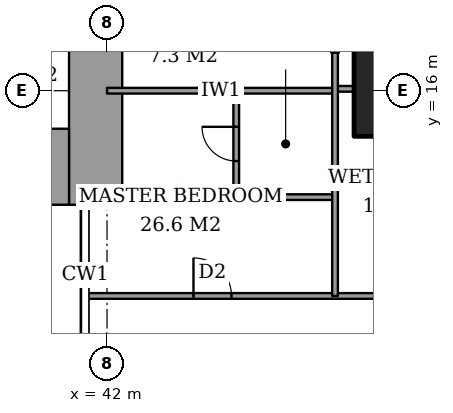
"""IFC4 building model, lengths in metres.
Left out: names, types, materials, properties, quantities, classifications, styles, units other than length and angle.
Written with IfcOpenShell. Run it as: python <this file> out.ifc"""

import sys

from ifc_helpers import new_model, si_unit, direction, frame, frame_2d, origin, origin_2d, place, context, subcontext, project, spatial, rectangle, extrude, element, fill, save


model = new_model("IFC4")
c1 = context("Model", 3, precision=1e-05, world=origin(), true_north=direction((0.0, 1.0)))
c2 = subcontext(c1, "Body", "Model", "MODEL_VIEW")
j1 = project(units=[si_unit("LENGTHUNIT", "METRE"), si_unit("PLANEANGLEUNIT", "RADIAN")], contexts=[c1])
p1 = place(None, origin())
s1 = spatial("IfcSite", under=j1, at=p1, CompositionType="ELEMENT")
p2 = place(p1, origin())
s2 = spatial("IfcBuilding", under=s1, at=p2, CompositionType="ELEMENT")
p3 = place(p2, frame((0.0, 0.0, 80.0)))
s3 = spatial("IfcBuildingStorey", under=s2, at=p3, CompositionType="ELEMENT", Elevation=80.0)
p4 = place(p3, frame((50.0, 16.0, 0.0), z_axis=(0.0, 0.0, 1.0), x_axis=(1.0, 0.0, 0.0)))
e1 = element("IfcColumn", 1, at=p4, inside=s3, PredefinedType="COLUMN", context=c2, shape_type="SweptSolid", body=[
    extrude(rectangle(XDim=3.0, YDim=2.4, at=origin_2d()), origin(), (0.0, 0.0, 1.0), 3.6),
])
p5 = place(p3, frame((37.85, 14.0, 0.0), z_axis=(0.0, 0.0, 1.0), x_axis=(1.0, 0.0, 0.0)))
e2 = element("IfcWall", 2, at=p5, inside=s3, PredefinedType="SHEAR", context=c2, shape_type="SweptSolid", body=[
    extrude(rectangle(XDim=3.15, YDim=2.0, at=frame_2d((1.575, 0.0))), origin(), (0.0, 0.0, 1.0), 3.6),
])
p6 = place(p3, frame((41.7, 13.0, 0.0), z_axis=(0.0, 0.0, 1.0), x_axis=(0.0, 1.0, 0.0)))
e3 = element("IfcWall", 3, at=p6, inside=s3, PredefinedType="SHEAR", context=c2, shape_type="SweptSolid", body=[
    extrude(rectangle(XDim=11.85, YDim=1.4, at=frame_2d((5.925, 0.0))), origin(), (0.0, 0.0, 1.0), 3.6),
])
p7 = place(p6, frame((7.5, 0.0, 0.0)))
e4 = element("IfcOpeningElement", 4, at=p7, cuts=e3, PredefinedType="OPENING", context=c2, shape_type="SweptSolid", body=[
    extrude(rectangle(XDim=1.8, YDim=2.4, at=frame_2d((0.9, 1.2))), frame((0.0, 0.71, 0.0), z_axis=(0.0, -1.0, 0.0), x_axis=(1.0, 0.0, 0.0)), (0.0, 0.0, 1.0), 1.42),
])
p8 = place(p3, frame((41.439, 10.6, 0.0), z_axis=(0.0, 0.0, 1.0), x_axis=(1.0, 0.0, 0.0)))
e5 = element("IfcWall", 5, at=p8, inside=s3, PredefinedType="PARTITIONING", context=c2, shape_type="SweptSolid", body=[
    extrude(rectangle(XDim=25.011, YDim=0.15, at=frame_2d((12.505, 0.0))), origin(), (0.0, 0.0, 1.0), 3.35),
])
p9 = place(p8, frame((10.761, 0.0, 0.0)))
e6 = element("IfcOpeningElement", 6, at=p9, cuts=e5, PredefinedType="OPENING", context=c2, shape_type="SweptSolid", body=[
    extrude(rectangle(XDim=1.0, YDim=2.1, at=frame_2d((0.5, 1.05))), frame((0.0, 0.085, 0.0), z_axis=(0.0, -1.0, 0.0), x_axis=(1.0, 0.0, 0.0)), (0.0, 0.0, 1.0), 0.17),
])
p10 = place(p8, frame((20.924, 0.0, 0.0)))
e7 = element("IfcOpeningElement", 7, at=p10, cuts=e5, PredefinedType="OPENING", context=c2, shape_type="SweptSolid", body=[
    extrude(rectangle(XDim=1.0, YDim=2.1, at=frame_2d((0.5, 1.05))), frame((0.0, 0.085, 0.0), z_axis=(0.0, -1.0, 0.0), x_axis=(1.0, 0.0, 0.0)), (0.0, 0.0, 1.0), 0.17),
])
p11 = place(p8, frame((15.749, 0.0, 0.0)))
e8 = element("IfcOpeningElement", 8, at=p11, cuts=e5, PredefinedType="OPENING", context=c2, shape_type="SweptSolid", body=[
    extrude(rectangle(XDim=0.9, YDim=2.1, at=frame_2d((0.45, 1.05))), frame((0.0, 0.085, 0.0), z_axis=(0.0, -1.0, 0.0), x_axis=(1.0, 0.0, 0.0)), (0.0, 0.0, 1.0), 0.17),
])
p12 = place(p8, frame((12.961, 0.0, 0.0)))
e9 = element("IfcOpeningElement", 9, at=p12, cuts=e5, PredefinedType="OPENING", context=c2, shape_type="SweptSolid", body=[
    extrude(rectangle(XDim=1.0, YDim=2.1, at=frame_2d((0.5, 1.05))), frame((0.0, 0.085, 0.0), z_axis=(0.0, -1.0, 0.0), x_axis=(1.0, 0.0, 0.0)), (0.0, 0.0, 1.0), 0.17),
])
p13 = place(p8, frame((7.861, 0.0, 0.0)))
e10 = element("IfcOpeningElement", 10, at=p13, cuts=e5, PredefinedType="OPENING", context=c2, shape_type="SweptSolid", body=[
    extrude(rectangle(XDim=1.0, YDim=2.1, at=frame_2d((0.5, 1.05))), frame((0.0, 0.085, 0.0), z_axis=(0.0, -1.0, 0.0), x_axis=(1.0, 0.0, 0.0)), (0.0, 0.0, 1.0), 0.17),
])
p14 = place(p8, frame((2.836, 0.0, 0.0)))
e11 = element("IfcOpeningElement", 11, at=p14, cuts=e5, PredefinedType="OPENING", context=c2, shape_type="SweptSolid", body=[
    extrude(rectangle(XDim=1.0, YDim=2.1, at=frame_2d((0.5, 1.05))), frame((0.0, 0.085, 0.0), z_axis=(0.0, -1.0, 0.0), x_axis=(1.0, 0.0, 0.0)), (0.0, 0.0, 1.0), 0.17),
])
p15 = place(p3, frame((45.4, 13.2, 0.0), z_axis=(0.0, 0.0, 1.0), x_axis=(1.0, 0.0, 0.0)))
e12 = element("IfcWall", 12, at=p15, inside=s3, PredefinedType="PARTITIONING", context=c2, shape_type="SweptSolid", body=[
    extrude(rectangle(XDim=2.6, YDim=0.15, at=frame_2d((1.3, 0.0))), origin(), (0.0, 0.0, 1.0), 3.35),
])
p16 = place(p3, frame((42.0, 16.0, 0.0), z_axis=(0.0, 0.0, 1.0), x_axis=(1.0, 0.0, 0.0)))
e13 = element("IfcWall", 13, at=p16, inside=s3, PredefinedType="PARTITIONING", context=c2, shape_type="SweptSolid", body=[
    extrude(rectangle(XDim=6.0, YDim=0.15, at=frame_2d((3.0, 0.0))), origin(), (0.0, 0.0, 1.0), 2.634),
])
p17 = place(p3, frame((48.0, 16.05, 0.0), z_axis=(0.0, 0.0, 1.0), x_axis=(1.0, 0.0, 0.0)))
e14 = element("IfcWall", 14, at=p17, inside=s3, PredefinedType="PARTITIONING", context=c2, shape_type="SweptSolid", body=[
    extrude(rectangle(XDim=0.5, YDim=0.15, at=frame_2d((0.25, 0.0))), origin(), (0.0, 0.0, 1.0), 2.634),
])
p18 = place(p3, frame((45.4, 13.2, 0.0), z_axis=(0.0, 0.0, 1.0), x_axis=(0.0, 1.0, 0.0)))
e15 = element("IfcWall", 15, at=p18, inside=s3, PredefinedType="PARTITIONING", context=c2, shape_type="SweptSolid", body=[
    extrude(rectangle(XDim=2.8, YDim=0.15, at=frame_2d((1.4, 0.0))), origin(), (0.0, 0.0, 1.0), 3.35),
])
p19 = place(p18, frame((0.95, 0.0, 0.0)))
e16 = element("IfcOpeningElement", 16, at=p19, cuts=e15, PredefinedType="OPENING", context=c2, shape_type="SweptSolid", body=[
    extrude(rectangle(XDim=0.9, YDim=2.1, at=frame_2d((0.45, 1.05))), frame((0.0, 0.085, 0.0), z_axis=(0.0, -1.0, 0.0), x_axis=(1.0, 0.0, 0.0)), (0.0, 0.0, 1.0), 0.17),
])
p20 = place(p3, frame((48.0, 10.6, 0.0), z_axis=(0.0, 0.0, 1.0), x_axis=(0.0, 1.0, 0.0)))
e17 = element("IfcWall", 17, at=p20, inside=s3, PredefinedType="PARTITIONING", context=c2, shape_type="SweptSolid", body=[
    extrude(rectangle(XDim=6.4, YDim=0.15, at=frame_2d((3.2, 0.0))), origin(), (0.0, 0.0, 1.0), 3.35),
])
p21 = place(p19, origin())
e18 = element("IfcDoor", 18, at=p21, inside=s3, OperationType="SINGLE_SWING_LEFT", PredefinedType="DOOR", context=c2, shape_type="SweptSolid", body=[
    extrude(rectangle(XDim=0.9, YDim=2.1, at=frame_2d((0.45, 1.05))), frame((0.0, 0.025, 0.0), z_axis=(0.0, -1.0, 0.0), x_axis=(1.0, 0.0, 0.0)), (0.0, 0.0, 1.0), 0.05),
])
fill(e16, e18)
p22 = place(p14, origin())
e19 = element("IfcDoor", 19, at=p22, inside=s3, OperationType="SINGLE_SWING_RIGHT", PredefinedType="DOOR", context=c2, shape_type="SweptSolid", body=[
    extrude(rectangle(XDim=1.0, YDim=2.1, at=frame_2d((0.5, 1.05))), frame((0.0, 0.025, 0.0), z_axis=(0.0, -1.0, 0.0), x_axis=(1.0, 0.0, 0.0)), (0.0, 0.0, 1.0), 0.05),
])
fill(e11, e19)
save(model, sys.argv[1])
